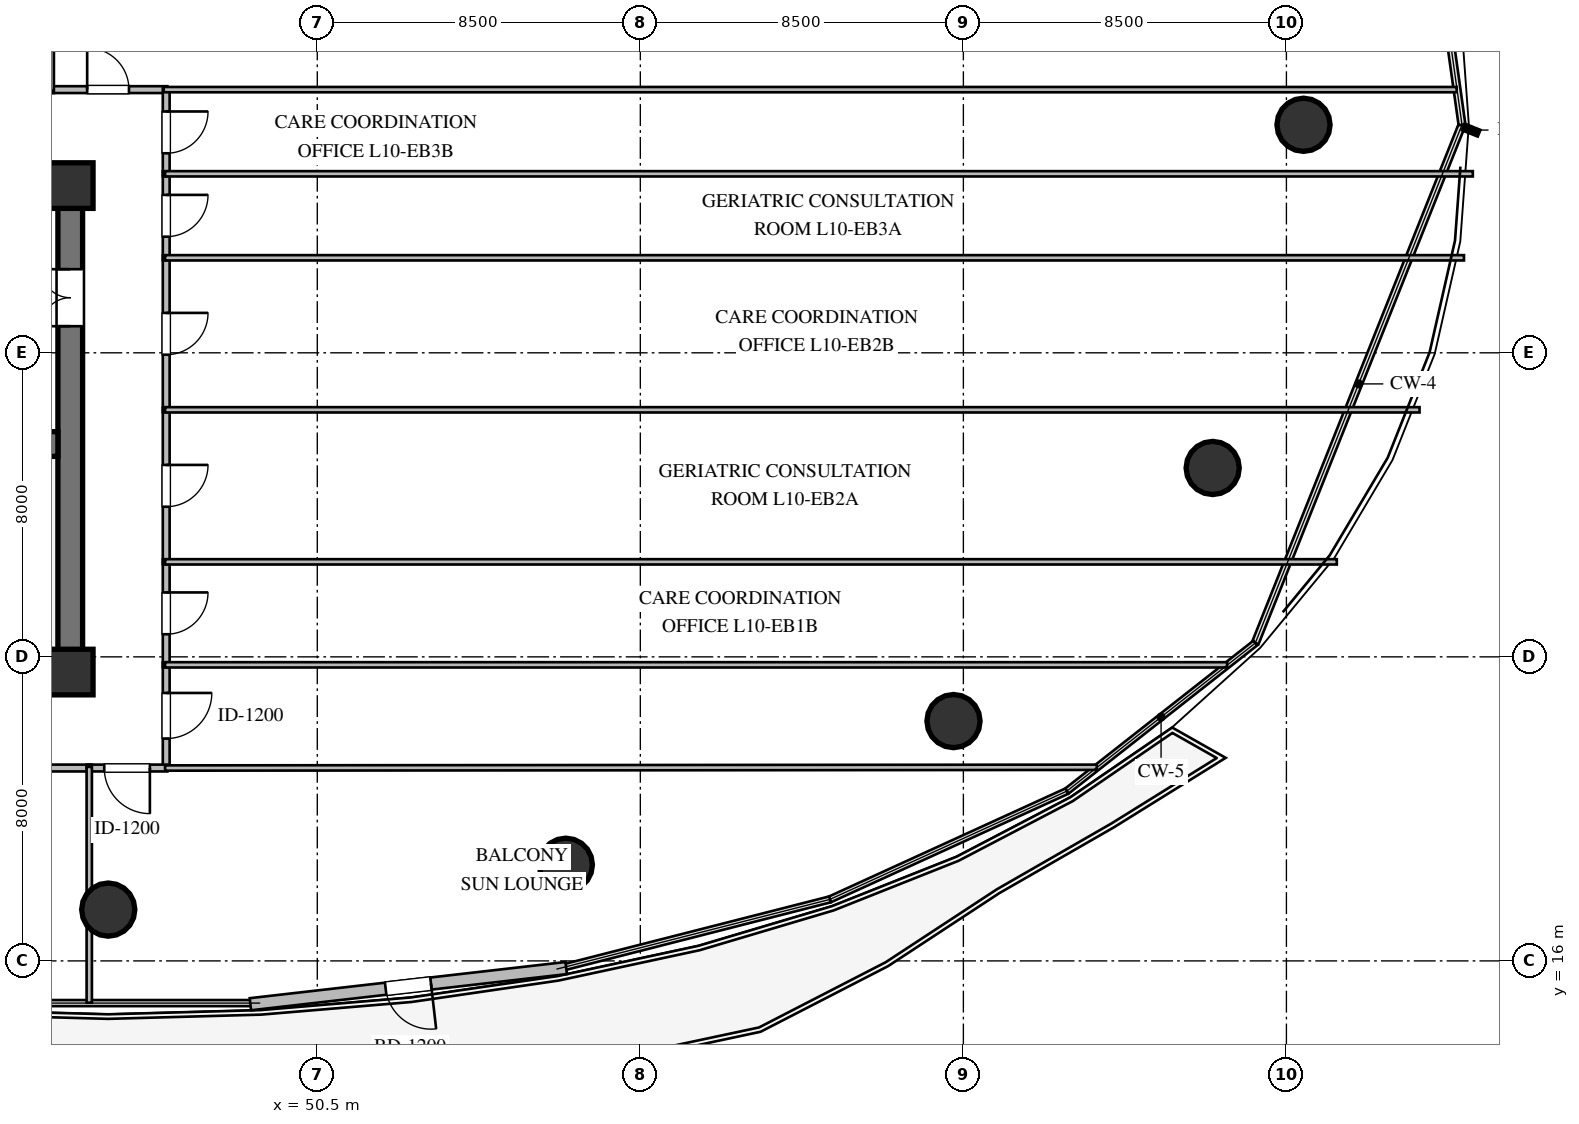
"""IFC4 building model, lengths in metres.
Left out: names, types, materials, properties, quantities, classifications, styles, units other than length and angle.
Written with IfcOpenShell. Run it as: python <this file> out.ifc"""

import sys

from ifc_helpers import new_model, si_unit, direction, frame, frame_2d, origin, origin_2d, place, context, subcontext, project, spatial, rectangle, circle, extrude, element, fill, save


model = new_model("IFC4")
c1 = context("Model", 3, precision=1e-05, world=origin(), true_north=direction((0.0, 1.0)))
c2 = subcontext(c1, "Body", "Model", "MODEL_VIEW")
j1 = project(units=[si_unit("LENGTHUNIT", "METRE"), si_unit("PLANEANGLEUNIT", "RADIAN")], contexts=[c1])
p1 = place(None, origin())
s1 = spatial("IfcSite", under=j1, at=p1, CompositionType="ELEMENT")
p2 = place(p1, origin())
s2 = spatial("IfcBuilding", under=s1, at=p2, CompositionType="ELEMENT")
p3 = place(p2, frame((0.0, 0.0, 42.0)))
s3 = spatial("IfcBuildingStorey", under=s2, at=p3, CompositionType="ELEMENT", Elevation=42.0)
for number, where, z_axis, x_axis in (
    (1, (21.675, 23.6, 0.0), (0.0, 0.0, 1.0), (1.0, 0.0, 0.0)),
    (2, (21.675, 36.4, 0.0), (0.0, 0.0, 1.0), (1.0, 0.0, 0.0)),
):
    element("IfcWall", number, at=place(p3, frame(where, z_axis=z_axis, x_axis=x_axis)), inside=s3, PredefinedType="SHEAR", context=c2, shape_type="SweptSolid", body=[
        extrude(rectangle(XDim=22.65, YDim=0.65, at=frame_2d((11.325, 0.0))), origin(), (0.0, 0.0, 1.0), 3.36),
    ])
p4 = place(p3, frame((44.0, 23.925, 0.0), z_axis=(0.0, 0.0, 1.0), x_axis=(0.0, 1.0, 0.0)))
e3 = element("IfcWall", 3, at=p4, inside=s3, PredefinedType="SHEAR", context=c2, shape_type="SweptSolid", body=[
    extrude(rectangle(XDim=12.15, YDim=0.65, at=frame_2d((6.075, 0.0))), origin(), (0.0, 0.0, 1.0), 3.36),
])
p5 = place(p4, frame((8.775, 0.0, 0.0)))
e4 = element("IfcOpeningElement", 4, at=p5, cuts=e3, PredefinedType="OPENING", context=c2, shape_type="SweptSolid", body=[
    extrude(rectangle(XDim=1.5, YDim=2.15, at=frame_2d((0.75, 1.075))), frame((0.0, 0.335, 0.0), z_axis=(0.0, -1.0, 0.0), x_axis=(1.0, 0.0, 0.0)), (0.0, 0.0, 1.0), 0.67),
])
p6 = place(p3, frame((22.325, 29.6, 0.0), z_axis=(0.0, 0.0, 1.0), x_axis=(1.0, 0.0, 0.0)))
e5 = element("IfcWall", 5, at=p6, inside=s3, PredefinedType="SHEAR", context=c2, shape_type="SweptSolid", body=[
    extrude(rectangle(XDim=21.35, YDim=0.65, at=frame_2d((10.675, 0.0))), origin(), (0.0, 0.0, 1.0), 3.36),
])
p7 = place(p6, frame((12.125, 0.0, 0.0)))
e6 = element("IfcOpeningElement", 6, at=p7, cuts=e5, PredefinedType="OPENING", context=c2, shape_type="SweptSolid", body=[
    extrude(rectangle(XDim=1.15, YDim=2.1, at=frame_2d((0.575, 1.05))), frame((0.0, 0.335, 0.0), z_axis=(0.0, -1.0, 0.0), x_axis=(1.0, 0.0, 0.0)), (0.0, 0.0, 1.0), 0.67),
])
for number, where, z_axis, x_axis in (
    (7, (44.0, 23.6, 0.0), (0.0, 0.0, 1.0), (1.0, 0.0, 0.0)),
    (8, (44.0, 36.4, 0.0), (0.0, 0.0, 1.0), (1.0, 0.0, 0.0)),
):
    element("IfcColumn", number, at=place(p3, frame(where, z_axis=z_axis, x_axis=x_axis)), inside=s3, PredefinedType="COLUMN", context=c2, shape_type="SweptSolid", body=[
        extrude(rectangle(XDim=1.2, YDim=1.2, at=origin_2d()), origin(), (0.0, 0.0, 1.0), 3.6),
    ])
for number, where, z_axis, x_axis in (
    (9, (76.45, 38.0, 0.0), (0.0, 0.0, 1.0), (1.0, 0.0, 0.0)),
    (10, (45.0, 17.35, 0.0), (0.0, 0.0, 1.0), (1.0, 0.0, 0.0)),
    (11, (57.04, 18.53, 0.0), (0.0, 0.0, 1.0), (1.0, 0.0, 0.0)),
    (12, (67.24, 22.31, 0.0), (0.0, 0.0, 1.0), (1.0, 0.0, 0.0)),
    (13, (74.06, 28.97, 0.0), (0.0, 0.0, 1.0), (1.0, 0.0, 0.0)),
):
    element("IfcColumn", number, at=place(p3, frame(where, z_axis=z_axis, x_axis=x_axis)), inside=s3, PredefinedType="COLUMN", context=c2, shape_type="SweptSolid", body=[
        extrude(circle(Radius=0.7, at=origin_2d()), origin(), (0.0, 0.0, 1.0), 3.6),
    ])
p8 = place(p3, frame((57.05, 15.812, 0.0), z_axis=(0.0, 0.0, 1.0), x_axis=(-0.993503192468, -0.113804246649, 0.0)))
e14 = element("IfcWall", 14, at=p8, inside=s3, PredefinedType="STANDARD", context=c2, shape_type="SweptSolid", body=[
    extrude(rectangle(XDim=8.365, YDim=0.32, at=frame_2d((4.182, 0.0))), origin(), (0.0, 0.0, 1.0), 3.36),
])
p9 = place(p8, frame((3.582, 0.0, 0.0)))
e15 = element("IfcOpeningElement", 15, at=p9, cuts=e14, PredefinedType="OPENING", context=c2, shape_type="SweptSolid", body=[
    extrude(rectangle(XDim=1.2, YDim=2.15, at=frame_2d((0.6, 1.075))), frame((0.0, 0.17, 0.0), z_axis=(0.0, -1.0, 0.0), x_axis=(1.0, 0.0, 0.0)), (0.0, 0.0, 1.0), 0.34),
])
p10 = place(p3, frame((39.435, 38.925, 0.0), z_axis=(0.0, 0.0, 1.0), x_axis=(1.0, 0.0, 0.0)))
e16 = element("IfcWall", 16, at=p10, inside=s3, PredefinedType="PARTITIONING", context=c2, shape_type="SweptSolid", body=[
    extrude(rectangle(XDim=4.13, YDim=0.18, at=frame_2d((2.065, 0.0))), origin(), (0.0, 0.0, 1.0), 3.36),
])
p11 = place(p10, frame((1.515, 0.0, 0.0)))
e17 = element("IfcOpeningElement", 17, at=p11, cuts=e16, PredefinedType="OPENING", context=c2, shape_type="SweptSolid", body=[
    extrude(rectangle(XDim=1.1, YDim=2.1, at=frame_2d((0.55, 1.05))), frame((0.0, 0.1, 0.0), z_axis=(0.0, -1.0, 0.0), x_axis=(1.0, 0.0, 0.0)), (0.0, 0.0, 1.0), 0.2),
])
p12 = place(p3, frame((43.435, 38.925, 0.0), z_axis=(0.0, 0.0, 1.0), x_axis=(1.0, 0.0, 0.0)))
e18 = element("IfcWall", 18, at=p12, inside=s3, PredefinedType="PARTITIONING", context=c2, shape_type="SweptSolid", body=[
    extrude(rectangle(XDim=3.12, YDim=0.18, at=frame_2d((1.56, 0.0))), origin(), (0.0, 0.0, 1.0), 3.36),
])
p13 = place(p12, frame((1.01, 0.0, 0.0)))
e19 = element("IfcOpeningElement", 19, at=p13, cuts=e18, PredefinedType="OPENING", context=c2, shape_type="SweptSolid", body=[
    extrude(rectangle(XDim=1.1, YDim=2.1, at=frame_2d((0.55, 1.05))), frame((0.0, 0.1, 0.0), z_axis=(0.0, -1.0, 0.0), x_axis=(1.0, 0.0, 0.0)), (0.0, 0.0, 1.0), 0.2),
])
p14 = place(p3, frame((46.525, 23.855, 0.0), z_axis=(0.0, 0.0, 1.0), x_axis=(0.0, -1.0, 0.0)))
e20 = element("IfcWall", 20, at=p14, inside=s3, PredefinedType="PARTITIONING", context=c2, shape_type="SweptSolid", body=[
    extrude(rectangle(XDim=2.81, YDim=0.18, at=frame_2d((1.405, 0.0))), origin(), (0.0, 0.0, 1.0), 3.36),
])
p15 = place(p14, frame((0.805, 0.0, 0.0)))
e21 = element("IfcOpeningElement", 21, at=p15, cuts=e20, PredefinedType="OPENING", context=c2, shape_type="SweptSolid", body=[
    extrude(rectangle(XDim=1.2, YDim=2.15, at=frame_2d((0.6, 1.075))), frame((0.0, 0.1, 0.0), z_axis=(0.0, -1.0, 0.0), x_axis=(1.0, 0.0, 0.0)), (0.0, 0.0, 1.0), 0.2),
])
p16 = place(p3, frame((46.525, 26.565, 0.0), z_axis=(0.0, 0.0, 1.0), x_axis=(0.0, -1.0, 0.0)))
e22 = element("IfcWall", 22, at=p16, inside=s3, PredefinedType="PARTITIONING", context=c2, shape_type="SweptSolid", body=[
    extrude(rectangle(XDim=2.84, YDim=0.18, at=frame_2d((1.42, 0.0))), origin(), (0.0, 0.0, 1.0), 3.36),
])
p17 = place(p16, frame((0.87, 0.0, 0.0)))
e23 = element("IfcOpeningElement", 23, at=p17, cuts=e22, PredefinedType="OPENING", context=c2, shape_type="SweptSolid", body=[
    extrude(rectangle(XDim=1.1, YDim=2.1, at=frame_2d((0.55, 1.05))), frame((0.0, 0.1, 0.0), z_axis=(0.0, -1.0, 0.0), x_axis=(1.0, 0.0, 0.0)), (0.0, 0.0, 1.0), 0.2),
])
p18 = place(p3, frame((46.525, 30.565, 0.0), z_axis=(0.0, 0.0, 1.0), x_axis=(0.0, -1.0, 0.0)))
e24 = element("IfcWall", 24, at=p18, inside=s3, PredefinedType="PARTITIONING", context=c2, shape_type="SweptSolid", body=[
    extrude(rectangle(XDim=4.13, YDim=0.18, at=frame_2d((2.065, 0.0))), origin(), (0.0, 0.0, 1.0), 3.36),
])
p19 = place(p18, frame((1.515, 0.0, 0.0)))
e25 = element("IfcOpeningElement", 25, at=p19, cuts=e24, PredefinedType="OPENING", context=c2, shape_type="SweptSolid", body=[
    extrude(rectangle(XDim=1.1, YDim=2.1, at=frame_2d((0.55, 1.05))), frame((0.0, 0.1, 0.0), z_axis=(0.0, -1.0, 0.0), x_axis=(1.0, 0.0, 0.0)), (0.0, 0.0, 1.0), 0.2),
])
p20 = place(p3, frame((46.525, 34.565, 0.0), z_axis=(0.0, 0.0, 1.0), x_axis=(0.0, -1.0, 0.0)))
e26 = element("IfcWall", 26, at=p20, inside=s3, PredefinedType="PARTITIONING", context=c2, shape_type="SweptSolid", body=[
    extrude(rectangle(XDim=4.13, YDim=0.18, at=frame_2d((2.065, 0.0))), origin(), (0.0, 0.0, 1.0), 3.36),
])
p21 = place(p20, frame((1.515, 0.0, 0.0)))
e27 = element("IfcOpeningElement", 27, at=p21, cuts=e26, PredefinedType="OPENING", context=c2, shape_type="SweptSolid", body=[
    extrude(rectangle(XDim=1.1, YDim=2.1, at=frame_2d((0.55, 1.05))), frame((0.0, 0.1, 0.0), z_axis=(0.0, -1.0, 0.0), x_axis=(1.0, 0.0, 0.0)), (0.0, 0.0, 1.0), 0.2),
])
p22 = place(p3, frame((46.525, 36.775, 0.0), z_axis=(0.0, 0.0, 1.0), x_axis=(0.0, -1.0, 0.0)))
e28 = element("IfcWall", 28, at=p22, inside=s3, PredefinedType="PARTITIONING", context=c2, shape_type="SweptSolid", body=[
    extrude(rectangle(XDim=2.34, YDim=0.18, at=frame_2d((1.17, 0.0))), origin(), (0.0, 0.0, 1.0), 3.36),
])
p23 = place(p22, frame((0.62, 0.0, 0.0)))
e29 = element("IfcOpeningElement", 29, at=p23, cuts=e28, PredefinedType="OPENING", context=c2, shape_type="SweptSolid", body=[
    extrude(rectangle(XDim=1.1, YDim=2.1, at=frame_2d((0.55, 1.05))), frame((0.0, 0.1, 0.0), z_axis=(0.0, -1.0, 0.0), x_axis=(1.0, 0.0, 0.0)), (0.0, 0.0, 1.0), 0.2),
])
p24 = place(p3, frame((46.525, 38.955, 0.0), z_axis=(0.0, 0.0, 1.0), x_axis=(0.0, -1.0, 0.0)))
e30 = element("IfcWall", 30, at=p24, inside=s3, PredefinedType="PARTITIONING", context=c2, shape_type="SweptSolid", body=[
    extrude(rectangle(XDim=2.31, YDim=0.18, at=frame_2d((1.155, 0.0))), origin(), (0.0, 0.0, 1.0), 3.36),
])
p25 = place(p24, frame((0.605, 0.0, 0.0)))
e31 = element("IfcOpeningElement", 31, at=p25, cuts=e30, PredefinedType="OPENING", context=c2, shape_type="SweptSolid", body=[
    extrude(rectangle(XDim=1.1, YDim=2.1, at=frame_2d((0.55, 1.05))), frame((0.0, 0.1, 0.0), z_axis=(0.0, -1.0, 0.0), x_axis=(1.0, 0.0, 0.0)), (0.0, 0.0, 1.0), 0.2),
])
p26 = place(p3, frame((44.565, 21.075, 0.0), z_axis=(0.0, 0.0, 1.0), x_axis=(-1.0, 0.0, 0.0)))
e32 = element("IfcWall", 32, at=p26, inside=s3, PredefinedType="PARTITIONING", context=c2, shape_type="SweptSolid", body=[
    extrude(rectangle(XDim=7.38, YDim=0.18, at=frame_2d((3.69, 0.0))), origin(), (0.0, 0.0, 1.0), 2.996),
])
p27 = place(p26, frame((3.14, 0.0, 0.0)))
e33 = element("IfcOpeningElement", 33, at=p27, cuts=e32, PredefinedType="OPENING", context=c2, shape_type="SweptSolid", body=[
    extrude(rectangle(XDim=1.1, YDim=2.1, at=frame_2d((0.55, 1.05))), frame((0.0, 0.1, 0.0), z_axis=(0.0, -1.0, 0.0), x_axis=(1.0, 0.0, 0.0)), (0.0, 0.0, 1.0), 0.2),
])
p28 = place(p3, frame((46.555, 21.075, 0.0), z_axis=(0.0, 0.0, 1.0), x_axis=(-1.0, 0.0, 0.0)))
e34 = element("IfcWall", 34, at=p28, inside=s3, PredefinedType="PARTITIONING", context=c2, shape_type="SweptSolid", body=[
    extrude(rectangle(XDim=2.12, YDim=0.18, at=frame_2d((1.06, 0.0))), origin(), (0.0, 0.0, 1.0), 3.36),
])
p29 = place(p28, frame((0.46, 0.0, 0.0)))
e35 = element("IfcOpeningElement", 35, at=p29, cuts=e34, PredefinedType="OPENING", context=c2, shape_type="SweptSolid", body=[
    extrude(rectangle(XDim=1.2, YDim=2.15, at=frame_2d((0.6, 1.075))), frame((0.0, 0.1, 0.0), z_axis=(0.0, -1.0, 0.0), x_axis=(1.0, 0.0, 0.0)), (0.0, 0.0, 1.0), 0.2),
])
p30 = place(p3, frame((43.5, 65.735, 0.0), z_axis=(0.0, 0.0, 1.0), x_axis=(0.0, -1.0, 0.0)))
e36 = element("IfcWall", 36, at=p30, inside=s3, PredefinedType="PARTITIONING", context=c2, shape_type="SweptSolid", body=[
    extrude(rectangle(XDim=26.84, YDim=0.14, at=frame_2d((13.42, 0.0))), origin(), (0.0, 0.0, 1.0), 2.806),
])
p31 = place(p3, frame((80.48, 38.925, 0.0), z_axis=(0.0, 0.0, 1.0), x_axis=(-1.0, 0.0, 0.0)))
e37 = element("IfcWall", 37, at=p31, inside=s3, PredefinedType="PARTITIONING", context=c2, shape_type="SweptSolid", body=[
    extrude(rectangle(XDim=34.02, YDim=0.14, at=frame_2d((17.01, 0.0))), origin(), (0.0, 0.0, 1.0), 3.36),
])
p32 = place(p3, frame((46.495, 23.79, 0.0), z_axis=(0.0, 0.0, 1.0), x_axis=(1.0, 0.0, 0.0)))
e38 = element("IfcWall", 38, at=p32, inside=s3, PredefinedType="PARTITIONING", context=c2, shape_type="SweptSolid", body=[
    extrude(rectangle(XDim=27.946, YDim=0.14, at=frame_2d((13.973, 0.0))), origin(), (0.0, 0.0, 1.0), 2.806),
])
p33 = place(p3, frame((71.011, 21.094, 0.0), z_axis=(0.0, 0.0, 1.0), x_axis=(-0.999999682646, -0.000796685534, 0.0)))
e39 = element("IfcWall", 39, at=p33, inside=s3, PredefinedType="PARTITIONING", context=c2, shape_type="SweptSolid", body=[
    extrude(rectangle(XDim=24.516, YDim=0.14, at=frame_2d((12.258, 0.0))), origin(), (0.0, 0.0, 1.0), 2.996),
])
p34 = place(p3, frame((46.495, 26.5, 0.0), z_axis=(0.0, 0.0, 1.0), x_axis=(1.0, 0.0, 0.0)))
e40 = element("IfcWall", 40, at=p34, inside=s3, PredefinedType="PARTITIONING", context=c2, shape_type="SweptSolid", body=[
    extrude(rectangle(XDim=30.831, YDim=0.14, at=frame_2d((15.416, 0.0))), origin(), (0.0, 0.0, 1.0), 2.806),
])
p35 = place(p3, frame((46.495, 30.5, 0.0), z_axis=(0.0, 0.0, 1.0), x_axis=(1.0, 0.0, 0.0)))
e41 = element("IfcWall", 41, at=p35, inside=s3, PredefinedType="PARTITIONING", context=c2, shape_type="SweptSolid", body=[
    extrude(rectangle(XDim=33.008, YDim=0.14, at=frame_2d((16.504, 0.0))), origin(), (0.0, 0.0, 1.0), 3.36),
])
p36 = place(p3, frame((46.495, 34.5, 0.0), z_axis=(0.0, 0.0, 1.0), x_axis=(1.0, 0.0, 0.0)))
e42 = element("IfcWall", 42, at=p36, inside=s3, PredefinedType="PARTITIONING", context=c2, shape_type="SweptSolid", body=[
    extrude(rectangle(XDim=34.177, YDim=0.14, at=frame_2d((17.088, 0.0))), origin(), (0.0, 0.0, 1.0), 3.36),
])
p37 = place(p3, frame((46.495, 36.71, 0.0), z_axis=(0.0, 0.0, 1.0), x_axis=(1.0, 0.0, 0.0)))
e43 = element("IfcWall", 43, at=p37, inside=s3, PredefinedType="PARTITIONING", context=c2, shape_type="SweptSolid", body=[
    extrude(rectangle(XDim=34.41, YDim=0.14, at=frame_2d((17.205, 0.0))), origin(), (0.0, 0.0, 1.0), 2.806),
])
p38 = place(p3, frame((44.5, 21.105, 0.0), z_axis=(0.0, 0.0, 1.0), x_axis=(0.0, -1.0, 0.0)))
e44 = element("IfcWall", 44, at=p38, inside=s3, PredefinedType="PARTITIONING", context=c2, shape_type="SweptSolid", body=[
    extrude(rectangle(XDim=6.205, YDim=0.14, at=frame_2d((3.103, 0.0))), origin(), (0.0, 0.0, 1.0), 2.806),
])
p39 = place(p9, origin())
e45 = element("IfcDoor", 45, at=p39, inside=s3, OperationType="SINGLE_SWING_LEFT", PredefinedType="DOOR", context=c2, shape_type="SweptSolid", body=[
    extrude(rectangle(XDim=1.2, YDim=2.15, at=frame_2d((0.6, 1.075))), frame((0.0, 0.025, 0.0), z_axis=(0.0, -1.0, 0.0), x_axis=(1.0, 0.0, 0.0)), (0.0, 0.0, 1.0), 0.05),
])
fill(e15, e45)
p40 = place(p5, origin())
e46 = element("IfcDoor", 46, at=p40, inside=s3, OperationType="DOUBLE_DOOR_SINGLE_SWING", PredefinedType="DOOR", context=c2, shape_type="SweptSolid", body=[
    extrude(rectangle(XDim=1.5, YDim=2.15, at=frame_2d((0.75, 1.075))), frame((0.0, 0.025, 0.0), z_axis=(0.0, -1.0, 0.0), x_axis=(1.0, 0.0, 0.0)), (0.0, 0.0, 1.0), 0.05),
])
fill(e4, e46)
p41 = place(p13, origin())
e47 = element("IfcDoor", 47, at=p41, inside=s3, OperationType="SINGLE_SWING_LEFT", PredefinedType="DOOR", context=c2, shape_type="SweptSolid", body=[
    extrude(rectangle(XDim=1.1, YDim=2.1, at=frame_2d((0.55, 1.05))), frame((0.0, 0.025, 0.0), z_axis=(0.0, -1.0, 0.0), x_axis=(1.0, 0.0, 0.0)), (0.0, 0.0, 1.0), 0.05),
])
fill(e19, e47)
p42 = place(p15, origin())
e48 = element("IfcDoor", 48, at=p42, inside=s3, OperationType="SINGLE_SWING_LEFT", PredefinedType="DOOR", context=c2, shape_type="SweptSolid", body=[
    extrude(rectangle(XDim=1.2, YDim=2.15, at=frame_2d((0.6, 1.075))), frame((0.0, 0.025, 0.0), z_axis=(0.0, -1.0, 0.0), x_axis=(1.0, 0.0, 0.0)), (0.0, 0.0, 1.0), 0.05),
])
fill(e21, e48)
p43 = place(p17, origin())
e49 = element("IfcDoor", 49, at=p43, inside=s3, OperationType="SINGLE_SWING_LEFT", PredefinedType="DOOR", context=c2, shape_type="SweptSolid", body=[
    extrude(rectangle(XDim=1.1, YDim=2.1, at=frame_2d((0.55, 1.05))), frame((0.0, 0.025, 0.0), z_axis=(0.0, -1.0, 0.0), x_axis=(1.0, 0.0, 0.0)), (0.0, 0.0, 1.0), 0.05),
])
fill(e23, e49)
p44 = place(p19, origin())
e50 = element("IfcDoor", 50, at=p44, inside=s3, OperationType="SINGLE_SWING_LEFT", PredefinedType="DOOR", context=c2, shape_type="SweptSolid", body=[
    extrude(rectangle(XDim=1.1, YDim=2.1, at=frame_2d((0.55, 1.05))), frame((0.0, 0.025, 0.0), z_axis=(0.0, -1.0, 0.0), x_axis=(1.0, 0.0, 0.0)), (0.0, 0.0, 1.0), 0.05),
])
fill(e25, e50)
p45 = place(p21, origin())
e51 = element("IfcDoor", 51, at=p45, inside=s3, OperationType="SINGLE_SWING_LEFT", PredefinedType="DOOR", context=c2, shape_type="SweptSolid", body=[
    extrude(rectangle(XDim=1.1, YDim=2.1, at=frame_2d((0.55, 1.05))), frame((0.0, 0.025, 0.0), z_axis=(0.0, -1.0, 0.0), x_axis=(1.0, 0.0, 0.0)), (0.0, 0.0, 1.0), 0.05),
])
fill(e27, e51)
p46 = place(p23, origin())
e52 = element("IfcDoor", 52, at=p46, inside=s3, OperationType="SINGLE_SWING_LEFT", PredefinedType="DOOR", context=c2, shape_type="SweptSolid", body=[
    extrude(rectangle(XDim=1.1, YDim=2.1, at=frame_2d((0.55, 1.05))), frame((0.0, 0.025, 0.0), z_axis=(0.0, -1.0, 0.0), x_axis=(1.0, 0.0, 0.0)), (0.0, 0.0, 1.0), 0.05),
])
fill(e29, e52)
p47 = place(p25, origin())
e53 = element("IfcDoor", 53, at=p47, inside=s3, OperationType="SINGLE_SWING_LEFT", PredefinedType="DOOR", context=c2, shape_type="SweptSolid", body=[
    extrude(rectangle(XDim=1.1, YDim=2.1, at=frame_2d((0.55, 1.05))), frame((0.0, 0.025, 0.0), z_axis=(0.0, -1.0, 0.0), x_axis=(1.0, 0.0, 0.0)), (0.0, 0.0, 1.0), 0.05),
])
fill(e31, e53)
p48 = place(p29, origin())
e54 = element("IfcDoor", 54, at=p48, inside=s3, OperationType="SINGLE_SWING_LEFT", PredefinedType="DOOR", context=c2, shape_type="SweptSolid", body=[
    extrude(rectangle(XDim=1.2, YDim=2.15, at=frame_2d((0.6, 1.075))), frame((0.0, 0.025, 0.0), z_axis=(0.0, -1.0, 0.0), x_axis=(1.0, 0.0, 0.0)), (0.0, 0.0, 1.0), 0.05),
])
fill(e35, e54)
save(model, sys.argv[1])
